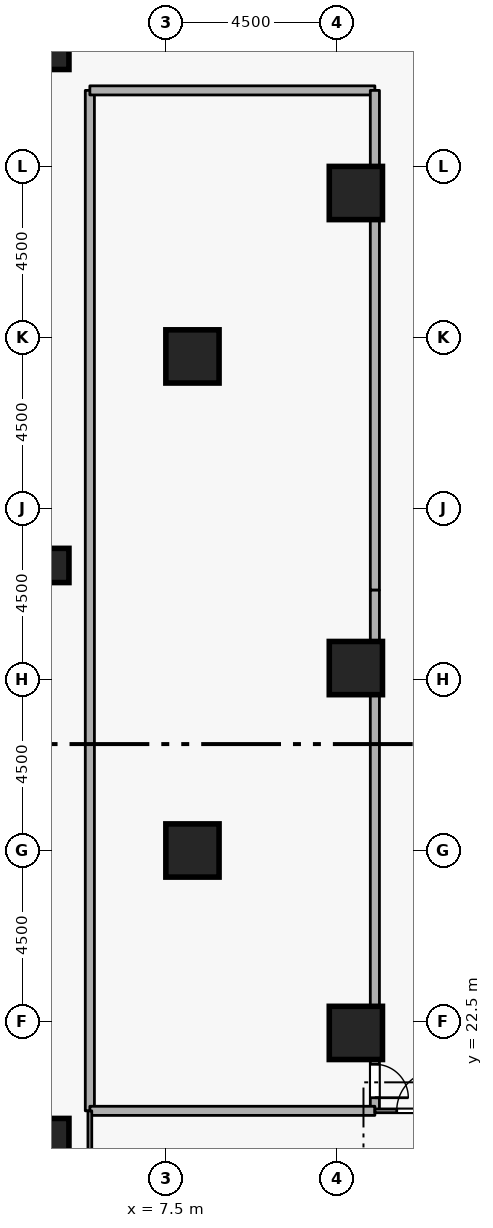
"""IFC4 building model, lengths in metres.
Left out: names, types, materials, properties, quantities, classifications, styles, units other than length and angle.
Written with IfcOpenShell. Run it as: python <this file> out.ifc"""

import sys

from ifc_helpers import new_model, si_unit, direction, frame, frame_2d, origin, origin_2d, place, context, subcontext, project, spatial, rectangle, extrude, element, fill, save


model = new_model("IFC4")
c1 = context("Model", 3, precision=1e-05, world=origin(), true_north=direction((0.0, 1.0)))
c2 = subcontext(c1, "Body", "Model", "MODEL_VIEW")
j1 = project(units=[si_unit("LENGTHUNIT", "METRE"), si_unit("PLANEANGLEUNIT", "RADIAN")], contexts=[c1])
p1 = place(None, origin())
s1 = spatial("IfcSite", under=j1, at=p1, CompositionType="ELEMENT")
p2 = place(p1, origin())
s2 = spatial("IfcBuilding", under=s1, at=p2, CompositionType="ELEMENT")
p3 = place(p2, frame((0.0, 0.0, -5.4)))
s3 = spatial("IfcBuildingStorey", under=s2, at=p3, CompositionType="ELEMENT", Elevation=-5.4)
for number, where, z_axis, x_axis in (
    (1, (12.5, 44.3, -0.6), (0.0, 0.0, 1.0), (1.0, 0.0, 0.0)),
    (2, (8.2, 27.0, -0.6), (0.0, 0.0, 1.0), (1.0, 0.0, 0.0)),
    (3, (8.2, 40.0, -0.6), (0.0, 0.0, 1.0), (1.0, 0.0, 0.0)),
    (4, (12.5, 22.2, -0.6), (0.0, 0.0, 1.0), (1.0, 0.0, 0.0)),
    (5, (12.5, 31.8, -0.6), (0.0, 0.0, 1.0), (1.0, 0.0, 0.0)),
):
    element("IfcColumn", number, at=place(p3, frame(where, z_axis=z_axis, x_axis=x_axis)), inside=s3, PredefinedType="COLUMN", context=c2, shape_type="SweptSolid", body=[
        extrude(rectangle(XDim=1.4, YDim=1.4, at=origin_2d()), origin(), (0.0, 0.0, 1.0), 6.0),
    ])
for number, where, z_axis, x_axis in (
    (6, (4.5, 19.5, -0.6), (0.0, 0.0, 1.0), (1.0, 0.0, 0.0)),
    (7, (4.5, 34.5, -0.6), (0.0, 0.0, 1.0), (1.0, 0.0, 0.0)),
    (8, (4.5, 48.0, -0.6), (0.0, 0.0, 1.0), (1.0, 0.0, 0.0)),
):
    element("IfcColumn", number, at=place(p3, frame(where, z_axis=z_axis, x_axis=x_axis)), inside=s3, PredefinedType="COLUMN", context=c2, shape_type="SweptSolid", body=[
        extrude(rectangle(XDim=0.9, YDim=0.9, at=origin_2d()), origin(), (0.0, 0.0, 1.0), 6.0),
    ])
p4 = place(p3, frame((5.5, 20.15, 0.0), z_axis=(0.0, 0.0, 1.0), x_axis=(0.0, 1.0, 0.0)))
e9 = element("IfcWall", 9, at=p4, inside=s3, PredefinedType="STANDARD", context=c2, shape_type="SweptSolid", body=[
    extrude(rectangle(XDim=26.85, YDim=0.24, at=frame_2d((13.425, 0.0))), origin(), (0.0, 0.0, 1.0), 5.06),
])
p5 = place(p3, frame((5.5, 47.0, 0.0), z_axis=(0.0, 0.0, 1.0), x_axis=(1.0, 0.0, 0.0)))
e10 = element("IfcWall", 10, at=p5, inside=s3, PredefinedType="STANDARD", context=c2, shape_type="SweptSolid", body=[
    extrude(rectangle(XDim=7.5, YDim=0.24, at=frame_2d((3.75, 0.0))), origin(), (0.0, 0.0, 1.0), 5.06),
])
p6 = place(p3, frame((13.0, 47.0, 0.0), z_axis=(0.0, 0.0, 1.0), x_axis=(0.0, -1.0, 0.0)))
e11 = element("IfcWall", 11, at=p6, inside=s3, PredefinedType="STANDARD", context=c2, shape_type="SweptSolid", body=[
    extrude(rectangle(XDim=13.15, YDim=0.24, at=frame_2d((6.575, 0.0))), origin(), (0.0, 0.0, 1.0), 5.06),
])
p7 = place(p3, frame((13.0, 33.85, 0.0), z_axis=(0.0, 0.0, 1.0), x_axis=(0.0, -1.0, 0.0)))
e12 = element("IfcWall", 12, at=p7, inside=s3, PredefinedType="STANDARD", context=c2, shape_type="SweptSolid", body=[
    extrude(rectangle(XDim=2.15, YDim=0.24, at=frame_2d((1.075, 0.0))), origin(), (0.0, 0.0, 1.0), 5.06),
])
p8 = place(p3, frame((13.0, 31.7, 0.0), z_axis=(0.0, 0.0, 1.0), x_axis=(0.0, -1.0, 0.0)))
e13 = element("IfcWall", 13, at=p8, inside=s3, PredefinedType="STANDARD", context=c2, shape_type="SweptSolid", body=[
    extrude(rectangle(XDim=9.98, YDim=0.24, at=frame_2d((4.99, 0.0))), origin(), (0.0, 0.0, 1.0), 5.06),
])
p9 = place(p3, frame((13.0, 21.72, 0.0), z_axis=(0.0, 0.0, 1.0), x_axis=(0.0, -1.0, 0.0)))
e14 = element("IfcWall", 14, at=p9, inside=s3, PredefinedType="STANDARD", context=c2, shape_type="SweptSolid", body=[
    extrude(rectangle(XDim=1.57, YDim=0.24, at=frame_2d((0.785, 0.0))), origin(), (0.0, 0.0, 1.0), 5.06),
])
p10 = place(p9, frame((0.345, 0.0, 0.0)))
e15 = element("IfcOpeningElement", 15, at=p10, cuts=e14, PredefinedType="OPENING", context=c2, shape_type="SweptSolid", body=[
    extrude(rectangle(XDim=0.88, YDim=2.04, at=frame_2d((0.44, 1.02))), frame((0.0, 0.13, 0.0), z_axis=(0.0, -1.0, 0.0), x_axis=(1.0, 0.0, 0.0)), (0.0, 0.0, 1.0), 0.26),
])
p11 = place(p3, frame((13.0, 20.15, 0.0), z_axis=(0.0, 0.0, 1.0), x_axis=(-1.0, 0.0, 0.0)))
e16 = element("IfcWall", 16, at=p11, inside=s3, PredefinedType="STANDARD", context=c2, shape_type="SweptSolid", body=[
    extrude(rectangle(XDim=7.5, YDim=0.24, at=frame_2d((3.75, 0.0))), origin(), (0.0, 0.0, 1.0), 5.06),
])
p12 = place(p3, frame((5.5, 6.0, 0.0), z_axis=(0.0, 0.0, 1.0), x_axis=(0.0, 1.0, 0.0)))
e17 = element("IfcWall", 17, at=p12, inside=s3, PredefinedType="PARTITIONING", context=c2, shape_type="SweptSolid", body=[
    extrude(rectangle(XDim=14.15, YDim=0.1, at=frame_2d((7.075, 0.0))), origin(), (0.0, 0.0, 1.0), 5.06),
])
p13 = place(p3, frame((13.0, 20.15, 0.0), z_axis=(0.0, 0.0, 1.0), x_axis=(1.0, 0.0, 0.0)))
e18 = element("IfcWall", 18, at=p13, inside=s3, PredefinedType="PARTITIONING", context=c2, shape_type="SweptSolid", body=[
    extrude(rectangle(XDim=2.2, YDim=0.1, at=frame_2d((1.1, 0.0))), origin(), (0.0, 0.0, 1.0), 5.06),
])
p14 = place(p13, frame((0.575, 0.0, 0.0)))
e19 = element("IfcOpeningElement", 19, at=p14, cuts=e18, PredefinedType="OPENING", context=c2, shape_type="SweptSolid", body=[
    extrude(rectangle(XDim=1.05, YDim=2.1, at=frame_2d((0.525, 1.05))), frame((0.0, 0.06, 0.0), z_axis=(0.0, -1.0, 0.0), x_axis=(1.0, 0.0, 0.0)), (0.0, 0.0, 1.0), 0.12),
])
p15 = place(p14, origin())
e20 = element("IfcDoor", 20, at=p15, inside=s3, OperationType="SINGLE_SWING_RIGHT", PredefinedType="DOOR", context=c2, shape_type="SweptSolid", body=[
    extrude(rectangle(XDim=1.05, YDim=2.1, at=frame_2d((0.525, 1.05))), frame((0.0, 0.025, 0.0), z_axis=(0.0, -1.0, 0.0), x_axis=(1.0, 0.0, 0.0)), (0.0, 0.0, 1.0), 0.05),
])
fill(e19, e20)
p16 = place(p10, origin())
e21 = element("IfcDoor", 21, at=p16, inside=s3, OperationType="SINGLE_SWING_RIGHT", PredefinedType="DOOR", context=c2, shape_type="SweptSolid", body=[
    extrude(rectangle(XDim=0.88, YDim=2.04, at=frame_2d((0.44, 1.02))), frame((0.0, 0.025, 0.0), z_axis=(0.0, -1.0, 0.0), x_axis=(1.0, 0.0, 0.0)), (0.0, 0.0, 1.0), 0.05),
])
fill(e15, e21)
save(model, sys.argv[1])
